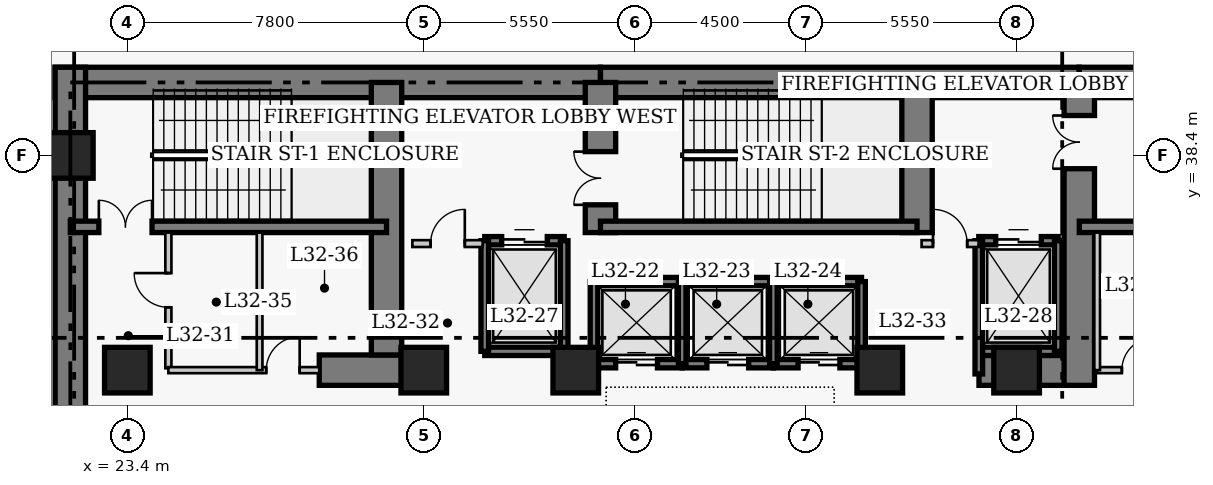
"""IFC4 building model, lengths in metres.
Left out: names, types, materials, properties, quantities, classifications, styles, units other than length and angle.
Written with IfcOpenShell. Run it as: python <this file> out.ifc"""

import sys

from ifc_helpers import new_model, si_unit, direction, frame, frame_2d, origin, origin_2d, place, context, subcontext, project, spatial, rectangle, extrude, element, fill, save


model = new_model("IFC4")
c1 = context("Model", 3, precision=1e-05, world=origin(), true_north=direction((0.0, 1.0)))
c2 = subcontext(c1, "Body", "Model", "MODEL_VIEW")
j1 = project(units=[si_unit("LENGTHUNIT", "METRE"), si_unit("PLANEANGLEUNIT", "RADIAN")], contexts=[c1])
p1 = place(None, origin())
s1 = spatial("IfcSite", under=j1, at=p1, CompositionType="ELEMENT")
p2 = place(p1, origin())
s2 = spatial("IfcBuilding", under=s1, at=p2, CompositionType="ELEMENT")
p3 = place(p2, frame((0.0, 0.0, 129.8)))
s3 = spatial("IfcBuildingStorey", under=s2, at=p3, CompositionType="ELEMENT", Elevation=129.8)
p4 = place(p3, frame((21.5, 40.32, 0.0), z_axis=(0.0, 0.0, 1.0), x_axis=(1.0, 0.0, 0.0)))
e1 = element("IfcWall", 1, at=p4, inside=s3, PredefinedType="SHEAR", context=c2, shape_type="SweptSolid", body=[
    extrude(rectangle(XDim=14.35, YDim=0.8, at=frame_2d((7.175, 0.0))), origin(), (0.0, 0.0, 1.0), 4.8),
])
p5 = place(p3, frame((35.85, 40.32, 0.0), z_axis=(0.0, 0.0, 1.0), x_axis=(1.0, 0.0, 0.0)))
e2 = element("IfcWall", 2, at=p5, inside=s3, PredefinedType="SHEAR", context=c2, shape_type="SweptSolid", body=[
    extrude(rectangle(XDim=12.6, YDim=0.8, at=frame_2d((6.3, 0.0))), origin(), (0.0, 0.0, 1.0), 4.8),
])
p6 = place(p3, frame((48.45, 40.32, 0.0), z_axis=(0.0, 0.0, 1.0), x_axis=(1.0, 0.0, 0.0)))
e3 = element("IfcWall", 3, at=p6, inside=s3, PredefinedType="SHEAR", context=c2, shape_type="SweptSolid", body=[
    extrude(rectangle(XDim=8.87, YDim=0.8, at=frame_2d((4.435, 0.0))), origin(), (0.0, 0.0, 1.0), 4.8),
])
p7 = place(p3, frame((21.9, 27.05, 0.0), z_axis=(0.0, 0.0, 1.0), x_axis=(0.0, 1.0, 0.0)))
e4 = element("IfcWall", 4, at=p7, inside=s3, PredefinedType="SHEAR", context=c2, shape_type="SweptSolid", body=[
    extrude(rectangle(XDim=13.67, YDim=0.8, at=frame_2d((6.835, 0.0))), origin(), (0.0, 0.0, 1.0), 4.8),
])
p8 = place(p3, frame((28.45, 32.75, 0.0), z_axis=(0.0, 0.0, 1.0), x_axis=(1.0, 0.0, 0.0)))
e5 = element("IfcWall", 5, at=p8, inside=s3, PredefinedType="SHEAR", context=c2, shape_type="SweptSolid", body=[
    extrude(rectangle(XDim=2.4, YDim=0.8, at=frame_2d((1.2, 0.0))), origin(), (0.0, 0.0, 1.0), 4.8),
])
p9 = place(p3, frame((45.81, 32.75, 0.0), z_axis=(0.0, 0.0, 1.0), x_axis=(1.0, 0.0, 0.0)))
e6 = element("IfcWall", 6, at=p9, inside=s3, PredefinedType="SHEAR", context=c2, shape_type="SweptSolid", body=[
    extrude(rectangle(XDim=2.64, YDim=0.8, at=frame_2d((1.32, 0.0))), origin(), (0.0, 0.0, 1.0), 4.8),
])
p10 = place(p3, frame((30.22, 33.15, 0.0), z_axis=(0.0, 0.0, 1.0), x_axis=(0.0, 1.0, 0.0)))
e7 = element("IfcWall", 7, at=p10, inside=s3, PredefinedType="SHEAR", context=c2, shape_type="SweptSolid", body=[
    extrude(rectangle(XDim=7.17, YDim=0.8, at=frame_2d((3.585, 0.0))), origin(), (0.0, 0.0, 1.0), 4.8),
])
p11 = place(p3, frame((35.85, 36.37, 0.0), z_axis=(0.0, 0.0, 1.0), x_axis=(0.0, 1.0, 0.0)))
e8 = element("IfcWall", 8, at=p11, inside=s3, PredefinedType="SHEAR", context=c2, shape_type="SweptSolid", body=[
    extrude(rectangle(XDim=3.95, YDim=0.8, at=frame_2d((1.975, 0.0))), origin(), (0.0, 0.0, 1.0), 4.8),
])
p12 = place(p11, frame((0.73, 0.0, 0.0)))
e9 = element("IfcOpeningElement", 9, at=p12, cuts=e8, PredefinedType="OPENING", context=c2, shape_type="SweptSolid", body=[
    extrude(rectangle(XDim=1.4, YDim=2.15, at=frame_2d((0.7, 1.075))), frame((0.0, 0.41, 0.0), z_axis=(0.0, -1.0, 0.0), x_axis=(1.0, 0.0, 0.0)), (0.0, 0.0, 1.0), 0.82),
])
p13 = place(p3, frame((44.18, 36.37, 0.0), z_axis=(0.0, 0.0, 1.0), x_axis=(0.0, 1.0, 0.0)))
e10 = element("IfcWall", 10, at=p13, inside=s3, PredefinedType="SHEAR", context=c2, shape_type="SweptSolid", body=[
    extrude(rectangle(XDim=3.95, YDim=0.8, at=frame_2d((1.975, 0.0))), origin(), (0.0, 0.0, 1.0), 4.8),
])
p14 = place(p3, frame((48.45, 32.35, 0.0), z_axis=(0.0, 0.0, 1.0), x_axis=(0.0, 1.0, 0.0)))
e11 = element("IfcWall", 11, at=p14, inside=s3, PredefinedType="SHEAR", context=c2, shape_type="SweptSolid", body=[
    extrude(rectangle(XDim=7.97, YDim=0.8, at=frame_2d((3.985, 0.0))), origin(), (0.0, 0.0, 1.0), 4.8),
])
p15 = place(p14, frame((5.7, 0.0, 0.0)))
e12 = element("IfcOpeningElement", 12, at=p15, cuts=e11, PredefinedType="OPENING", context=c2, shape_type="SweptSolid", body=[
    extrude(rectangle(XDim=1.4, YDim=2.15, at=frame_2d((0.7, 1.075))), frame((0.0, 0.41, 0.0), z_axis=(0.0, -1.0, 0.0), x_axis=(1.0, 0.0, 0.0)), (0.0, 0.0, 1.0), 0.82),
])
p16 = place(p3, frame((21.9, 36.52, 0.0), z_axis=(0.0, 0.0, 1.0), x_axis=(1.0, 0.0, 0.0)))
e13 = element("IfcWall", 13, at=p16, inside=s3, PredefinedType="SHEAR", context=c2, shape_type="SweptSolid", body=[
    extrude(rectangle(XDim=8.32, YDim=0.3, at=frame_2d((4.16, 0.0))), origin(), (0.0, 0.0, 1.0), 4.8),
])
p17 = place(p16, frame((0.75, 0.0, 0.0)))
e14 = element("IfcOpeningElement", 14, at=p17, cuts=e13, PredefinedType="OPENING", context=c2, shape_type="SweptSolid", body=[
    extrude(rectangle(XDim=1.4, YDim=2.15, at=frame_2d((0.7, 1.075))), frame((0.0, 0.16, 0.0), z_axis=(0.0, -1.0, 0.0), x_axis=(1.0, 0.0, 0.0)), (0.0, 0.0, 1.0), 0.32),
])
p18 = place(p3, frame((35.85, 36.52, 0.0), z_axis=(0.0, 0.0, 1.0), x_axis=(1.0, 0.0, 0.0)))
e15 = element("IfcWall", 15, at=p18, inside=s3, PredefinedType="SHEAR", context=c2, shape_type="SweptSolid", body=[
    extrude(rectangle(XDim=8.33, YDim=0.3, at=frame_2d((4.165, 0.0))), origin(), (0.0, 0.0, 1.0), 4.8),
])
p19 = place(p3, frame((48.45, 36.52, 0.0), z_axis=(0.0, 0.0, 1.0), x_axis=(1.0, 0.0, 0.0)))
e16 = element("IfcWall", 16, at=p19, inside=s3, PredefinedType="SHEAR", context=c2, shape_type="SweptSolid", body=[
    extrude(rectangle(XDim=8.47, YDim=0.3, at=frame_2d((4.235, 0.0))), origin(), (0.0, 0.0, 1.0), 4.8),
])
for number, where, z_axis, x_axis in (
    (17, (21.9, 38.4, 0.0), (0.0, 0.0, 1.0), (1.0, 0.0, 0.0)),
    (18, (23.4, 32.75, 0.0), (0.0, 0.0, 1.0), (1.0, 0.0, 0.0)),
    (19, (31.2, 32.75, 0.0), (0.0, 0.0, 1.0), (1.0, 0.0, 0.0)),
    (20, (35.2, 32.75, 0.0), (0.0, 0.0, 1.0), (1.0, 0.0, 0.0)),
    (21, (43.2, 32.75, 0.0), (0.0, 0.0, 1.0), (1.0, 0.0, 0.0)),
    (22, (46.8, 32.75, 0.0), (0.0, 0.0, 1.0), (1.0, 0.0, 0.0)),
):
    element("IfcColumn", number, at=place(p3, frame(where, z_axis=z_axis, x_axis=x_axis)), inside=s3, PredefinedType="COLUMN", context=c2, shape_type="SweptSolid", body=[
        extrude(rectangle(XDim=1.2, YDim=1.2, at=origin_2d()), origin(), (0.0, 0.0, 1.0), 4.8),
    ])
p20 = place(p3, frame((35.68, 35.08, 0.0), z_axis=(0.0, 0.0, 1.0), x_axis=(1.0, 0.0, 0.0)))
e23 = element("IfcWall", 23, at=p20, inside=s3, PredefinedType="SHEAR", context=c2, shape_type="SweptSolid", body=[
    extrude(rectangle(XDim=2.32, YDim=0.22, at=frame_2d((1.16, 0.0))), origin(), (0.0, 0.0, 1.0), 4.8),
])
p21 = place(p3, frame((35.68, 32.92, 0.0), z_axis=(0.0, 0.0, 1.0), x_axis=(1.0, 0.0, 0.0)))
e24 = element("IfcWall", 24, at=p21, inside=s3, PredefinedType="SHEAR", context=c2, shape_type="SweptSolid", body=[
    extrude(rectangle(XDim=2.32, YDim=0.22, at=frame_2d((1.16, 0.0))), origin(), (0.0, 0.0, 1.0), 4.8),
])
p22 = place(p21, frame((0.57, 0.0, 0.0)))
e25 = element("IfcOpeningElement", 25, at=p22, cuts=e24, PredefinedType="OPENING", context=c2, shape_type="SweptSolid", body=[
    extrude(rectangle(XDim=1.1, YDim=2.15, at=frame_2d((0.55, 1.075))), frame((0.0, 0.12, 0.0), z_axis=(0.0, -1.0, 0.0), x_axis=(1.0, 0.0, 0.0)), (0.0, 0.0, 1.0), 0.24),
])
p23 = place(p3, frame((35.68, 32.92, 0.0), z_axis=(0.0, 0.0, 1.0), x_axis=(0.0, 1.0, 0.0)))
e26 = element("IfcWall", 26, at=p23, inside=s3, PredefinedType="SHEAR", context=c2, shape_type="SweptSolid", body=[
    extrude(rectangle(XDim=2.16, YDim=0.2, at=frame_2d((1.08, 0.0))), origin(), (0.0, 0.0, 1.0), 4.8),
])
p24 = place(p3, frame((38.0, 35.08, 0.0), z_axis=(0.0, 0.0, 1.0), x_axis=(1.0, 0.0, 0.0)))
e27 = element("IfcWall", 27, at=p24, inside=s3, PredefinedType="SHEAR", context=c2, shape_type="SweptSolid", body=[
    extrude(rectangle(XDim=2.4, YDim=0.22, at=frame_2d((1.2, 0.0))), origin(), (0.0, 0.0, 1.0), 4.8),
])
p25 = place(p3, frame((38.0, 32.92, 0.0), z_axis=(0.0, 0.0, 1.0), x_axis=(1.0, 0.0, 0.0)))
e28 = element("IfcWall", 28, at=p25, inside=s3, PredefinedType="SHEAR", context=c2, shape_type="SweptSolid", body=[
    extrude(rectangle(XDim=2.4, YDim=0.22, at=frame_2d((1.2, 0.0))), origin(), (0.0, 0.0, 1.0), 4.8),
])
p26 = place(p25, frame((0.65, 0.0, 0.0)))
e29 = element("IfcOpeningElement", 29, at=p26, cuts=e28, PredefinedType="OPENING", context=c2, shape_type="SweptSolid", body=[
    extrude(rectangle(XDim=1.1, YDim=2.15, at=frame_2d((0.55, 1.075))), frame((0.0, 0.12, 0.0), z_axis=(0.0, -1.0, 0.0), x_axis=(1.0, 0.0, 0.0)), (0.0, 0.0, 1.0), 0.24),
])
p27 = place(p3, frame((38.0, 32.92, 0.0), z_axis=(0.0, 0.0, 1.0), x_axis=(0.0, 1.0, 0.0)))
e30 = element("IfcWall", 30, at=p27, inside=s3, PredefinedType="SHEAR", context=c2, shape_type="SweptSolid", body=[
    extrude(rectangle(XDim=2.16, YDim=0.2, at=frame_2d((1.08, 0.0))), origin(), (0.0, 0.0, 1.0), 4.8),
])
p28 = place(p3, frame((40.4, 35.08, 0.0), z_axis=(0.0, 0.0, 1.0), x_axis=(1.0, 0.0, 0.0)))
e31 = element("IfcWall", 31, at=p28, inside=s3, PredefinedType="SHEAR", context=c2, shape_type="SweptSolid", body=[
    extrude(rectangle(XDim=2.32, YDim=0.22, at=frame_2d((1.16, 0.0))), origin(), (0.0, 0.0, 1.0), 4.8),
])
p29 = place(p3, frame((40.4, 32.92, 0.0), z_axis=(0.0, 0.0, 1.0), x_axis=(1.0, 0.0, 0.0)))
e32 = element("IfcWall", 32, at=p29, inside=s3, PredefinedType="SHEAR", context=c2, shape_type="SweptSolid", body=[
    extrude(rectangle(XDim=2.32, YDim=0.22, at=frame_2d((1.16, 0.0))), origin(), (0.0, 0.0, 1.0), 4.8),
])
p30 = place(p29, frame((0.65, 0.0, 0.0)))
e33 = element("IfcOpeningElement", 33, at=p30, cuts=e32, PredefinedType="OPENING", context=c2, shape_type="SweptSolid", body=[
    extrude(rectangle(XDim=1.1, YDim=2.15, at=frame_2d((0.55, 1.075))), frame((0.0, 0.12, 0.0), z_axis=(0.0, -1.0, 0.0), x_axis=(1.0, 0.0, 0.0)), (0.0, 0.0, 1.0), 0.24),
])
for number, where, z_axis, x_axis in (
    (34, (40.4, 32.92, 0.0), (0.0, 0.0, 1.0), (0.0, 1.0, 0.0)),
    (35, (42.72, 32.92, 0.0), (0.0, 0.0, 1.0), (0.0, 1.0, 0.0)),
):
    element("IfcWall", number, at=place(p3, frame(where, z_axis=z_axis, x_axis=x_axis)), inside=s3, PredefinedType="SHEAR", context=c2, shape_type="SweptSolid", body=[
        extrude(rectangle(XDim=2.16, YDim=0.2, at=frame_2d((1.08, 0.0))), origin(), (0.0, 0.0, 1.0), 4.8),
    ])
p31 = place(p3, frame((32.805, 36.155, 0.0), z_axis=(0.0, 0.0, 1.0), x_axis=(1.0, 0.0, 0.0)))
e36 = element("IfcWall", 36, at=p31, inside=s3, PredefinedType="SHEAR", context=c2, shape_type="SweptSolid", body=[
    extrude(rectangle(XDim=2.09, YDim=0.22, at=frame_2d((1.045, 0.0))), origin(), (0.0, 0.0, 1.0), 4.8),
])
p32 = place(p31, frame((0.445, 0.0, 0.0)))
e37 = element("IfcOpeningElement", 37, at=p32, cuts=e36, PredefinedType="OPENING", context=c2, shape_type="SweptSolid", body=[
    extrude(rectangle(XDim=1.2, YDim=2.15, at=frame_2d((0.6, 1.075))), frame((0.0, 0.12, 0.0), z_axis=(0.0, -1.0, 0.0), x_axis=(1.0, 0.0, 0.0)), (0.0, 0.0, 1.0), 0.24),
])
p33 = place(p3, frame((32.805, 33.245, 0.0), z_axis=(0.0, 0.0, 1.0), x_axis=(1.0, 0.0, 0.0)))
e38 = element("IfcWall", 38, at=p33, inside=s3, PredefinedType="SHEAR", context=c2, shape_type="SweptSolid", body=[
    extrude(rectangle(XDim=2.09, YDim=0.22, at=frame_2d((1.045, 0.0))), origin(), (0.0, 0.0, 1.0), 4.8),
])
for number, where, z_axis, x_axis in (
    (39, (32.805, 33.245, 0.0), (0.0, 0.0, 1.0), (0.0, 1.0, 0.0)),
    (40, (34.895, 33.245, 0.0), (0.0, 0.0, 1.0), (0.0, 1.0, 0.0)),
):
    element("IfcWall", number, at=place(p3, frame(where, z_axis=z_axis, x_axis=x_axis)), inside=s3, PredefinedType="SHEAR", context=c2, shape_type="SweptSolid", body=[
        extrude(rectangle(XDim=2.91, YDim=0.2, at=frame_2d((1.455, 0.0))), origin(), (0.0, 0.0, 1.0), 4.8),
    ])
p34 = place(p3, frame((45.805, 36.155, 0.0), z_axis=(0.0, 0.0, 1.0), x_axis=(1.0, 0.0, 0.0)))
e41 = element("IfcWall", 41, at=p34, inside=s3, PredefinedType="SHEAR", context=c2, shape_type="SweptSolid", body=[
    extrude(rectangle(XDim=2.09, YDim=0.22, at=frame_2d((1.045, 0.0))), origin(), (0.0, 0.0, 1.0), 4.8),
])
p35 = place(p34, frame((0.445, 0.0, 0.0)))
e42 = element("IfcOpeningElement", 42, at=p35, cuts=e41, PredefinedType="OPENING", context=c2, shape_type="SweptSolid", body=[
    extrude(rectangle(XDim=1.2, YDim=2.15, at=frame_2d((0.6, 1.075))), frame((0.0, 0.12, 0.0), z_axis=(0.0, -1.0, 0.0), x_axis=(1.0, 0.0, 0.0)), (0.0, 0.0, 1.0), 0.24),
])
p36 = place(p3, frame((45.805, 33.245, 0.0), z_axis=(0.0, 0.0, 1.0), x_axis=(1.0, 0.0, 0.0)))
e43 = element("IfcWall", 43, at=p36, inside=s3, PredefinedType="SHEAR", context=c2, shape_type="SweptSolid", body=[
    extrude(rectangle(XDim=2.09, YDim=0.22, at=frame_2d((1.045, 0.0))), origin(), (0.0, 0.0, 1.0), 4.8),
])
p37 = place(p3, frame((45.805, 32.65, 0.0), z_axis=(0.0, 0.0, 1.0), x_axis=(0.0, 1.0, 0.0)))
e44 = element("IfcWall", 44, at=p37, inside=s3, PredefinedType="SHEAR", context=c2, shape_type="SweptSolid", body=[
    extrude(rectangle(XDim=3.505, YDim=0.2, at=frame_2d((1.752, 0.0))), origin(), (0.0, 0.0, 1.0), 4.8),
])
p38 = place(p3, frame((47.895, 33.245, 0.0), z_axis=(0.0, 0.0, 1.0), x_axis=(0.0, 1.0, 0.0)))
e45 = element("IfcWall", 45, at=p38, inside=s3, PredefinedType="SHEAR", context=c2, shape_type="SweptSolid", body=[
    extrude(rectangle(XDim=2.91, YDim=0.2, at=frame_2d((1.455, 0.0))), origin(), (0.0, 0.0, 1.0), 4.8),
])
p39 = place(p3, frame((30.9, 36.08, 0.0), z_axis=(0.0, 0.0, 1.0), x_axis=(1.0, 0.0, 0.0)))
e46 = element("IfcWall", 46, at=p39, inside=s3, PredefinedType="PARTITIONING", context=c2, shape_type="SweptSolid", body=[
    extrude(rectangle(XDim=1.85, YDim=0.18, at=frame_2d((0.925, 0.0))), origin(), (0.0, 0.0, 1.0), 4.55),
])
p40 = place(p39, frame((0.48, 0.0, 0.0)))
e47 = element("IfcOpeningElement", 47, at=p40, cuts=e46, PredefinedType="OPENING", context=c2, shape_type="SweptSolid", body=[
    extrude(rectangle(XDim=0.9, YDim=2.15, at=frame_2d((0.45, 1.075))), frame((0.0, 0.1, 0.0), z_axis=(0.0, -1.0, 0.0), x_axis=(1.0, 0.0, 0.0)), (0.0, 0.0, 1.0), 0.2),
])
p41 = place(p3, frame((44.3, 36.08, 0.0), z_axis=(0.0, 0.0, 1.0), x_axis=(1.0, 0.0, 0.0)))
e48 = element("IfcWall", 48, at=p41, inside=s3, PredefinedType="PARTITIONING", context=c2, shape_type="SweptSolid", body=[
    extrude(rectangle(XDim=1.5, YDim=0.18, at=frame_2d((0.75, 0.0))), origin(), (0.0, 0.0, 1.0), 4.55),
])
p42 = place(p41, frame((0.3, 0.0, 0.0)))
e49 = element("IfcOpeningElement", 49, at=p42, cuts=e48, PredefinedType="OPENING", context=c2, shape_type="SweptSolid", body=[
    extrude(rectangle(XDim=0.9, YDim=2.15, at=frame_2d((0.45, 1.075))), frame((0.0, 0.1, 0.0), z_axis=(0.0, -1.0, 0.0), x_axis=(1.0, 0.0, 0.0)), (0.0, 0.0, 1.0), 0.2),
])
p43 = place(p3, frame((24.48, 32.8, 0.0), z_axis=(0.0, 0.0, 1.0), x_axis=(0.0, 1.0, 0.0)))
e50 = element("IfcWall", 50, at=p43, inside=s3, PredefinedType="PARTITIONING", context=c2, shape_type="SweptSolid", body=[
    extrude(rectangle(XDim=3.57, YDim=0.16, at=frame_2d((1.785, 0.0))), origin(), (0.0, 0.0, 1.0), 4.55),
])
p44 = place(p43, frame((1.604, 0.0, 0.0)))
e51 = element("IfcOpeningElement", 51, at=p44, cuts=e50, PredefinedType="OPENING", context=c2, shape_type="SweptSolid", body=[
    extrude(rectangle(XDim=0.9, YDim=2.1, at=frame_2d((0.45, 1.05))), frame((0.0, 0.09, 0.0), z_axis=(0.0, -1.0, 0.0), x_axis=(1.0, 0.0, 0.0)), (0.0, 0.0, 1.0), 0.18),
])
p45 = place(p3, frame((24.48, 32.75, 0.0), z_axis=(0.0, 0.0, 1.0), x_axis=(1.0, 0.0, 0.0)))
e52 = element("IfcWall", 52, at=p45, inside=s3, PredefinedType="PARTITIONING", context=c2, shape_type="SweptSolid", body=[
    extrude(rectangle(XDim=3.97, YDim=0.16, at=frame_2d((1.985, 0.0))), origin(), (0.0, 0.0, 1.0), 4.55),
])
p46 = place(p45, frame((2.575, 0.0, 0.0)))
e53 = element("IfcOpeningElement", 53, at=p46, cuts=e52, PredefinedType="OPENING", context=c2, shape_type="SweptSolid", body=[
    extrude(rectangle(XDim=0.88, YDim=2.05, at=frame_2d((0.44, 1.025))), frame((0.0, 0.09, 0.0), z_axis=(0.0, -1.0, 0.0), x_axis=(1.0, 0.0, 0.0)), (0.0, 0.0, 1.0), 0.18),
])
p47 = place(p3, frame((48.92, 32.75, 0.0), z_axis=(0.0, 0.0, 1.0), x_axis=(1.0, 0.0, 0.0)))
e54 = element("IfcWall", 54, at=p47, inside=s3, PredefinedType="PARTITIONING", context=c2, shape_type="SweptSolid", body=[
    extrude(rectangle(XDim=2.2, YDim=0.16, at=frame_2d((1.1, 0.0))), origin(), (0.0, 0.0, 1.0), 4.55),
])
p48 = place(p47, frame((0.65, 0.0, 0.0)))
e55 = element("IfcOpeningElement", 55, at=p48, cuts=e54, PredefinedType="OPENING", context=c2, shape_type="SweptSolid", body=[
    extrude(rectangle(XDim=0.86, YDim=2.05, at=frame_2d((0.43, 1.025))), frame((0.0, 0.09, 0.0), z_axis=(0.0, -1.0, 0.0), x_axis=(1.0, 0.0, 0.0)), (0.0, 0.0, 1.0), 0.18),
])
for number, where, z_axis, x_axis in (
    (56, (48.92, 32.75, 0.0), (0.0, 0.0, 1.0), (0.0, 1.0, 0.0)),
    (57, (26.88, 32.75, 0.0), (0.0, 0.0, 1.0), (0.0, 1.0, 0.0)),
):
    element("IfcWall", number, at=place(p3, frame(where, z_axis=z_axis, x_axis=x_axis)), inside=s3, PredefinedType="PARTITIONING", context=c2, shape_type="SweptSolid", body=[
        extrude(rectangle(XDim=3.62, YDim=0.15, at=frame_2d((1.81, 0.0))), origin(), (0.0, 0.0, 1.0), 4.55),
    ])
p49 = place(p22, origin())
e58 = element("IfcDoor", 58, at=p49, inside=s3, OperationType="DOUBLE_DOOR_SLIDING", PredefinedType="DOOR", context=c2, shape_type="SweptSolid", body=[
    extrude(rectangle(XDim=1.1, YDim=2.15, at=frame_2d((0.55, 1.075))), frame((0.0, 0.025, 0.0), z_axis=(0.0, -1.0, 0.0), x_axis=(1.0, 0.0, 0.0)), (0.0, 0.0, 1.0), 0.05),
])
fill(e25, e58)
p50 = place(p26, origin())
e59 = element("IfcDoor", 59, at=p50, inside=s3, OperationType="DOUBLE_DOOR_SLIDING", PredefinedType="DOOR", context=c2, shape_type="SweptSolid", body=[
    extrude(rectangle(XDim=1.1, YDim=2.15, at=frame_2d((0.55, 1.075))), frame((0.0, 0.025, 0.0), z_axis=(0.0, -1.0, 0.0), x_axis=(1.0, 0.0, 0.0)), (0.0, 0.0, 1.0), 0.05),
])
fill(e29, e59)
p51 = place(p30, origin())
e60 = element("IfcDoor", 60, at=p51, inside=s3, OperationType="DOUBLE_DOOR_SLIDING", PredefinedType="DOOR", context=c2, shape_type="SweptSolid", body=[
    extrude(rectangle(XDim=1.1, YDim=2.15, at=frame_2d((0.55, 1.075))), frame((0.0, 0.025, 0.0), z_axis=(0.0, -1.0, 0.0), x_axis=(1.0, 0.0, 0.0)), (0.0, 0.0, 1.0), 0.05),
])
fill(e33, e60)
p52 = place(p32, origin())
e61 = element("IfcDoor", 61, at=p52, inside=s3, OperationType="DOUBLE_DOOR_SLIDING", PredefinedType="DOOR", context=c2, shape_type="SweptSolid", body=[
    extrude(rectangle(XDim=1.2, YDim=2.15, at=frame_2d((0.6, 1.075))), frame((0.0, 0.025, 0.0), z_axis=(0.0, -1.0, 0.0), x_axis=(1.0, 0.0, 0.0)), (0.0, 0.0, 1.0), 0.05),
])
fill(e37, e61)
p53 = place(p35, origin())
e62 = element("IfcDoor", 62, at=p53, inside=s3, OperationType="DOUBLE_DOOR_SLIDING", PredefinedType="DOOR", context=c2, shape_type="SweptSolid", body=[
    extrude(rectangle(XDim=1.2, YDim=2.15, at=frame_2d((0.6, 1.075))), frame((0.0, 0.025, 0.0), z_axis=(0.0, -1.0, 0.0), x_axis=(1.0, 0.0, 0.0)), (0.0, 0.0, 1.0), 0.05),
])
fill(e42, e62)
p54 = place(p40, origin())
e63 = element("IfcDoor", 63, at=p54, inside=s3, OperationType="SINGLE_SWING_RIGHT", PredefinedType="DOOR", context=c2, shape_type="SweptSolid", body=[
    extrude(rectangle(XDim=0.9, YDim=2.15, at=frame_2d((0.45, 1.075))), frame((0.0, 0.025, 0.0), z_axis=(0.0, -1.0, 0.0), x_axis=(1.0, 0.0, 0.0)), (0.0, 0.0, 1.0), 0.05),
])
fill(e47, e63)
p55 = place(p42, origin())
e64 = element("IfcDoor", 64, at=p55, inside=s3, OperationType="SINGLE_SWING_LEFT", PredefinedType="DOOR", context=c2, shape_type="SweptSolid", body=[
    extrude(rectangle(XDim=0.9, YDim=2.15, at=frame_2d((0.45, 1.075))), frame((0.0, 0.025, 0.0), z_axis=(0.0, -1.0, 0.0), x_axis=(1.0, 0.0, 0.0)), (0.0, 0.0, 1.0), 0.05),
])
fill(e49, e64)
p56 = place(p44, origin())
e65 = element("IfcDoor", 65, at=p56, inside=s3, OperationType="SINGLE_SWING_RIGHT", PredefinedType="DOOR", context=c2, shape_type="SweptSolid", body=[
    extrude(rectangle(XDim=0.9, YDim=2.1, at=frame_2d((0.45, 1.05))), frame((0.0, 0.025, 0.0), z_axis=(0.0, -1.0, 0.0), x_axis=(1.0, 0.0, 0.0)), (0.0, 0.0, 1.0), 0.05),
])
fill(e51, e65)
p57 = place(p46, origin())
e66 = element("IfcDoor", 66, at=p57, inside=s3, OperationType="SINGLE_SWING_RIGHT", PredefinedType="DOOR", context=c2, shape_type="SweptSolid", body=[
    extrude(rectangle(XDim=0.88, YDim=2.05, at=frame_2d((0.44, 1.025))), frame((0.0, 0.025, 0.0), z_axis=(0.0, -1.0, 0.0), x_axis=(1.0, 0.0, 0.0)), (0.0, 0.0, 1.0), 0.05),
])
fill(e53, e66)
p58 = place(p48, origin())
e67 = element("IfcDoor", 67, at=p58, inside=s3, OperationType="SINGLE_SWING_RIGHT", PredefinedType="DOOR", context=c2, shape_type="SweptSolid", body=[
    extrude(rectangle(XDim=0.86, YDim=2.05, at=frame_2d((0.43, 1.025))), frame((0.0, 0.025, 0.0), z_axis=(0.0, -1.0, 0.0), x_axis=(1.0, 0.0, 0.0)), (0.0, 0.0, 1.0), 0.05),
])
fill(e55, e67)
p59 = place(p17, origin())
e68 = element("IfcDoor", 68, at=p59, inside=s3, OperationType="DOUBLE_DOOR_SINGLE_SWING", PredefinedType="DOOR", context=c2, shape_type="SweptSolid", body=[
    extrude(rectangle(XDim=1.4, YDim=2.15, at=frame_2d((0.7, 1.075))), frame((0.0, 0.025, 0.0), z_axis=(0.0, -1.0, 0.0), x_axis=(1.0, 0.0, 0.0)), (0.0, 0.0, 1.0), 0.05),
])
fill(e14, e68)
p60 = place(p12, origin())
e69 = element("IfcDoor", 69, at=p60, inside=s3, OperationType="DOUBLE_DOOR_SINGLE_SWING", PredefinedType="DOOR", context=c2, shape_type="SweptSolid", body=[
    extrude(rectangle(XDim=1.4, YDim=2.15, at=frame_2d((0.7, 1.075))), frame((0.0, 0.025, 0.0), z_axis=(0.0, -1.0, 0.0), x_axis=(1.0, 0.0, 0.0)), (0.0, 0.0, 1.0), 0.05),
])
fill(e9, e69)
p61 = place(p15, origin())
e70 = element("IfcDoor", 70, at=p61, inside=s3, OperationType="DOUBLE_DOOR_SINGLE_SWING", PredefinedType="DOOR", context=c2, shape_type="SweptSolid", body=[
    extrude(rectangle(XDim=1.4, YDim=2.15, at=frame_2d((0.7, 1.075))), frame((0.0, 0.025, 0.0), z_axis=(0.0, -1.0, 0.0), x_axis=(1.0, 0.0, 0.0)), (0.0, 0.0, 1.0), 0.05),
])
fill(e12, e70)
save(model, sys.argv[1])
